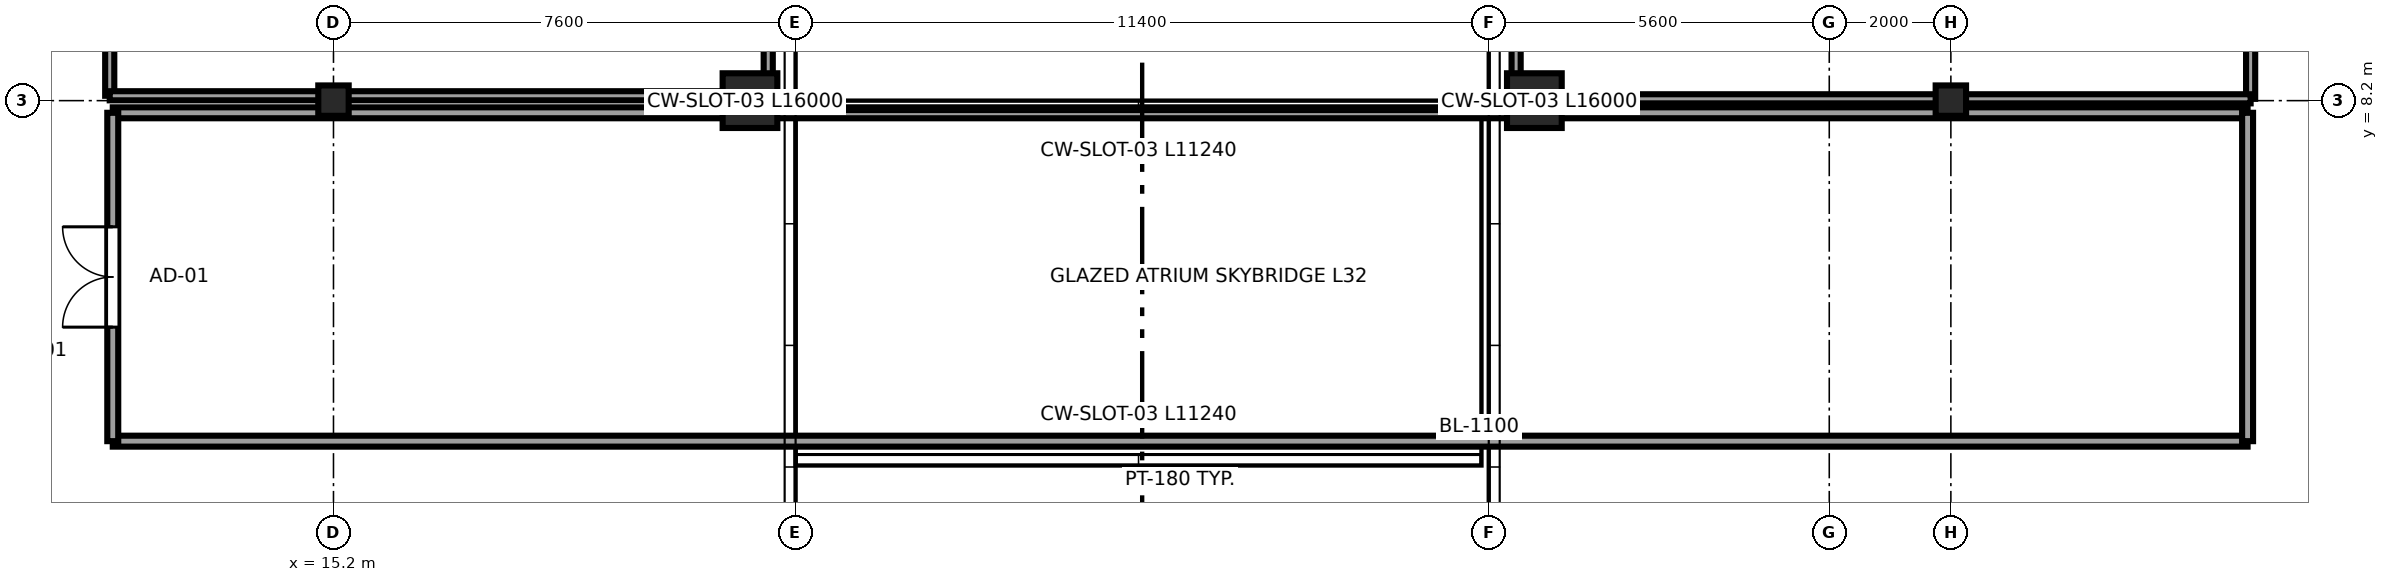
"""IFC4 building model, lengths in metres.
Left out: names, types, materials, properties, quantities, classifications, styles, units other than length and angle.
Written with IfcOpenShell. Run it as: python <this file> out.ifc"""

import sys

from ifc_helpers import new_model, si_unit, direction, frame, frame_2d, origin, origin_2d, place, context, subcontext, project, spatial, rectangle, i_section, extrude, source, transform, mapped, element, fill, save


model = new_model("IFC4")
c1 = context("Model", 3, precision=1e-05, world=origin(), true_north=direction((0.0, 1.0)))
c2 = subcontext(c1, "Body", "Model", "MODEL_VIEW")
j1 = project(units=[si_unit("LENGTHUNIT", "METRE"), si_unit("PLANEANGLEUNIT", "RADIAN")], contexts=[c1])
p1 = place(None, origin())
s1 = spatial("IfcSite", under=j1, at=p1, CompositionType="ELEMENT")
p2 = place(p1, origin())
s2 = spatial("IfcBuilding", under=s1, at=p2, CompositionType="ELEMENT")
p3 = place(p2, frame((0.0, 0.0, 125.75)))
s3 = spatial("IfcBuildingStorey", under=s2, at=p3, CompositionType="ELEMENT", Elevation=125.75)
m1 = source(origin(), c2, "Body", "SweptSolid", [
    extrude(i_section(OverallWidth=0.5, OverallDepth=0.5, WebThickness=0.022, FlangeThickness=0.034, at=origin_2d()), origin(), (0.0, 0.0, 1.0), 3.55),
])
p4 = place(p3, frame((15.2, 8.2, 0.0), z_axis=(0.0, 0.0, 1.0), x_axis=(1.0, 0.0, 0.0)))
e1 = element("IfcColumn", 1, at=p4, inside=s3, PredefinedType="COLUMN", context=c2, shape_type="MappedRepresentation", body=[
    mapped(m1, transform((0.0, 0.0, 0.0), x_axis=(1.0, 0.0, 0.0), y_axis=(0.0, 1.0, 0.0), z_axis=(0.0, 0.0, 1.0), scale=1.0)),
])
m2 = source(origin(), c2, "Body", "SweptSolid", [
    extrude(rectangle(XDim=0.9, YDim=0.9, at=origin_2d()), origin(), (0.0, 0.0, 1.0), 3.55),
])
for number, where, z_axis, x_axis in (
    (2, (22.05, 8.2, 0.0), (0.0, 0.0, 1.0), (1.0, 0.0, 0.0)),
    (3, (34.95, 8.2, 0.0), (0.0, 0.0, 1.0), (1.0, 0.0, 0.0)),
):
    element("IfcColumn", number, at=place(p3, frame(where, z_axis=z_axis, x_axis=x_axis)), inside=s3, PredefinedType="COLUMN", context=c2, shape_type="MappedRepresentation", body=[
        mapped(m2, transform((0.0, 0.0, 0.0), x_axis=(1.0, 0.0, 0.0), y_axis=(0.0, 1.0, 0.0), z_axis=(0.0, 0.0, 1.0), scale=1.0)),
    ])
p5 = place(p3, frame((41.8, 8.2, 0.0), z_axis=(0.0, 0.0, 1.0), x_axis=(1.0, 0.0, 0.0)))
e4 = element("IfcColumn", 4, at=p5, inside=s3, PredefinedType="COLUMN", context=c2, shape_type="MappedRepresentation", body=[
    mapped(m1, transform((0.0, 0.0, 0.0), x_axis=(1.0, 0.0, 0.0), y_axis=(0.0, 1.0, 0.0), z_axis=(0.0, 0.0, 1.0), scale=1.0)),
])
p6 = place(p3, frame((11.52, 8.28, 0.0), z_axis=(0.0, 0.0, 1.0), x_axis=(0.0, 1.0, 0.0)))
e5 = element("IfcWall", 5, at=p6, inside=s3, PredefinedType="PARTITIONING", context=c2, shape_type="SweptSolid", body=[
    extrude(rectangle(XDim=10.71, YDim=0.15, at=frame_2d((5.355, 0.0))), origin(), (0.0, 0.0, 1.0), 2.954),
])
p7 = place(p6, frame((4.845, 0.0, 0.0)))
e6 = element("IfcOpeningElement", 6, at=p7, cuts=e5, PredefinedType="OPENING", context=c2, shape_type="SweptSolid", body=[
    extrude(rectangle(XDim=0.98, YDim=2.12, at=frame_2d((0.49, 1.06))), frame((0.0, 0.085, 0.0), z_axis=(0.0, -1.0, 0.0), x_axis=(1.0, 0.0, 0.0)), (0.0, 0.0, 1.0), 0.17),
])
p8 = place(p3, frame((11.52, 8.28, 0.0), z_axis=(0.0, 0.0, 1.0), x_axis=(1.0, 0.0, 0.0)))
e7 = element("IfcWall", 7, at=p8, inside=s3, PredefinedType="PARTITIONING", context=c2, shape_type="SweptSolid", body=[
    extrude(rectangle(XDim=10.83, YDim=0.15, at=frame_2d((5.415, 0.0))), origin(), (0.0, 0.0, 1.0), 2.748),
])
p9 = place(p3, frame((22.35, 8.28, 0.0), z_axis=(0.0, 0.0, 1.0), x_axis=(0.0, 1.0, 0.0)))
e8 = element("IfcWall", 8, at=p9, inside=s3, PredefinedType="PARTITIONING", context=c2, shape_type="SweptSolid", body=[
    extrude(rectangle(XDim=13.04, YDim=0.15, at=frame_2d((6.52, 0.0))), origin(), (0.0, 0.0, 1.0), 3.37),
])
p10 = place(p3, frame((46.73, 8.23, 0.0), z_axis=(0.0, 0.0, 1.0), x_axis=(0.0, 1.0, 0.0)))
e9 = element("IfcWall", 9, at=p10, inside=s3, PredefinedType="PARTITIONING", context=c2, shape_type="SweptSolid", body=[
    extrude(rectangle(XDim=10.76, YDim=0.15, at=frame_2d((5.38, 0.0))), origin(), (0.0, 0.0, 1.0), 3.37),
])
p11 = place(p10, frame((4.87, 0.0, 0.0)))
e10 = element("IfcOpeningElement", 10, at=p11, cuts=e9, PredefinedType="OPENING", context=c2, shape_type="SweptSolid", body=[
    extrude(rectangle(XDim=0.98, YDim=2.12, at=frame_2d((0.49, 1.06))), frame((0.0, 0.085, 0.0), z_axis=(0.0, -1.0, 0.0), x_axis=(1.0, 0.0, 0.0)), (0.0, 0.0, 1.0), 0.17),
])
p12 = place(p3, frame((34.65, 8.23, 0.0), z_axis=(0.0, 0.0, 1.0), x_axis=(1.0, 0.0, 0.0)))
e11 = element("IfcWall", 11, at=p12, inside=s3, PredefinedType="PARTITIONING", context=c2, shape_type="SweptSolid", body=[
    extrude(rectangle(XDim=12.08, YDim=0.15, at=frame_2d((6.04, 0.0))), origin(), (0.0, 0.0, 1.0), 2.748),
])
p13 = place(p3, frame((34.65, 8.23, 0.0), z_axis=(0.0, 0.0, 1.0), x_axis=(0.0, 1.0, 0.0)))
e12 = element("IfcWall", 12, at=p13, inside=s3, PredefinedType="PARTITIONING", context=c2, shape_type="SweptSolid", body=[
    extrude(rectangle(XDim=13.09, YDim=0.15, at=frame_2d((6.545, 0.0))), origin(), (0.0, 0.0, 1.0), 3.37),
])
for number, where, z_axis, x_axis in (
    (13, (11.57, 2.6, 0.0), (0.0, 0.0, 1.0), (1.0, 0.0, 0.0)),
    (14, (11.57, 8.0, 0.0), (0.0, 0.0, 1.0), (1.0, 0.0, 0.0)),
):
    element("IfcWall", number, at=place(p3, frame(where, z_axis=z_axis, x_axis=x_axis)), inside=s3, PredefinedType="PARTITIONING", context=c2, shape_type="SweptSolid", body=[
        extrude(rectangle(XDim=35.11, YDim=0.18, at=frame_2d((17.555, 0.0))), origin(), (0.0, 0.0, 1.0), 3.37),
    ])
p14 = place(p3, frame((11.57, 2.6, 0.0), z_axis=(0.0, 0.0, 1.0), x_axis=(0.0, 1.0, 0.0)))
e15 = element("IfcWall", 15, at=p14, inside=s3, PredefinedType="PARTITIONING", context=c2, shape_type="SweptSolid", body=[
    extrude(rectangle(XDim=5.4, YDim=0.18, at=frame_2d((2.7, 0.0))), origin(), (0.0, 0.0, 1.0), 3.37),
])
p15 = place(p14, frame((1.875, 0.0, 0.0)))
e16 = element("IfcOpeningElement", 16, at=p15, cuts=e15, PredefinedType="OPENING", context=c2, shape_type="SweptSolid", body=[
    extrude(rectangle(XDim=1.65, YDim=2.15, at=frame_2d((0.825, 1.075))), frame((0.0, 0.1, 0.0), z_axis=(0.0, -1.0, 0.0), x_axis=(1.0, 0.0, 0.0)), (0.0, 0.0, 1.0), 0.2),
])
p16 = place(p3, frame((46.68, 2.6, 0.0), z_axis=(0.0, 0.0, 1.0), x_axis=(0.0, 1.0, 0.0)))
e17 = element("IfcWall", 17, at=p16, inside=s3, PredefinedType="PARTITIONING", context=c2, shape_type="SweptSolid", body=[
    extrude(rectangle(XDim=5.4, YDim=0.18, at=frame_2d((2.7, 0.0))), origin(), (0.0, 0.0, 1.0), 3.37),
])
m3 = source(origin(), c2, "Body", "SweptSolid", [
    extrude(rectangle(XDim=1.65, YDim=2.15, at=frame_2d((0.825, 1.075))), frame((0.0, 0.025, 0.0), z_axis=(0.0, -1.0, 0.0), x_axis=(1.0, 0.0, 0.0)), (0.0, 0.0, 1.0), 0.05),
])
p17 = place(p15, origin())
e18 = element("IfcDoor", 18, at=p17, inside=s3, OperationType="DOUBLE_DOOR_SINGLE_SWING", PredefinedType="DOOR", context=c2, shape_type="MappedRepresentation", body=[
    mapped(m3, transform((0.0, 0.0, 0.0), x_axis=(1.0, 0.0, 0.0), y_axis=(0.0, 1.0, 0.0), z_axis=(0.0, 0.0, 1.0), scale=1.0)),
])
fill(e16, e18)
save(model, sys.argv[1])
